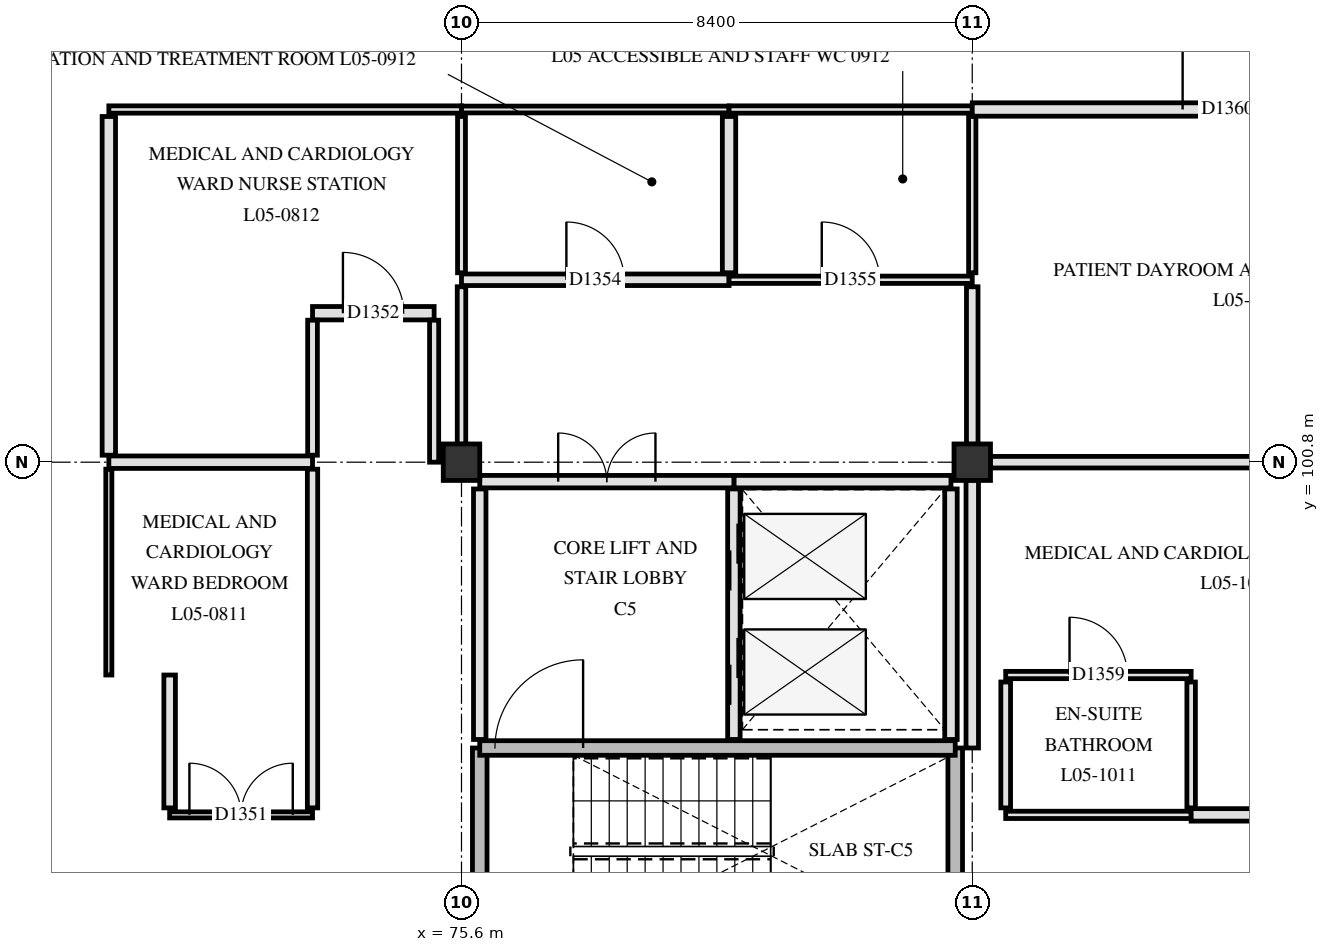
"""IFC4 building model, lengths in metres.
Left out: names, types, materials, properties, quantities, classifications, styles, units other than length and angle.
Written with IfcOpenShell. Run it as: python <this file> out.ifc"""

import sys

from ifc_helpers import new_model, si_unit, direction, frame, frame_2d, origin, origin_2d, place, context, subcontext, project, spatial, rectangle, extrude, element, fill, save


model = new_model("IFC4")
c1 = context("Model", 3, precision=1e-05, world=origin(), true_north=direction((0.0, 1.0)))
c2 = subcontext(c1, "Body", "Model", "MODEL_VIEW")
j1 = project(units=[si_unit("LENGTHUNIT", "METRE"), si_unit("PLANEANGLEUNIT", "RADIAN")], contexts=[c1])
p1 = place(None, origin())
s1 = spatial("IfcSite", under=j1, at=p1, CompositionType="ELEMENT")
p2 = place(p1, origin())
s2 = spatial("IfcBuilding", under=s1, at=p2, CompositionType="ELEMENT")
p3 = place(p2, frame((0.0, 0.0, 22.5)))
s3 = spatial("IfcBuildingStorey", under=s2, at=p3, CompositionType="ELEMENT", Elevation=22.5)
for number, where, z_axis, x_axis in (
    (1, (75.6, 100.8, 0.0), (0.0, 0.0, 1.0), (1.0, 0.0, 0.0)),
    (2, (84.0, 100.8, 0.0), (0.0, 0.0, 1.0), (1.0, 0.0, 0.0)),
):
    element("IfcColumn", number, at=place(p3, frame(where, z_axis=z_axis, x_axis=x_axis)), inside=s3, PredefinedType="COLUMN", context=c2, shape_type="SweptSolid", body=[
        extrude(rectangle(XDim=0.6, YDim=0.6, at=origin_2d()), origin(), (0.0, 0.0, 1.0), 3.9),
    ])
for number, where, z_axis, x_axis in (
    (3, (75.9, 92.78, 0.0), (0.0, 0.0, 1.0), (0.0, 1.0, 0.0)),
    (4, (83.72, 92.78, 0.0), (0.0, 0.0, 1.0), (0.0, 1.0, 0.0)),
):
    element("IfcWall", number, at=place(p3, frame(where, z_axis=z_axis, x_axis=x_axis)), inside=s3, PredefinedType="SHEAR", context=c2, shape_type="SweptSolid", body=[
        extrude(rectangle(XDim=3.32, YDim=0.24, at=frame_2d((1.66, 0.0))), origin(), (0.0, 0.0, 1.0), 3.62),
    ])
p4 = place(p3, frame((75.9, 96.1, 0.0), z_axis=(0.0, 0.0, 1.0), x_axis=(1.0, 0.0, 0.0)))
e5 = element("IfcWall", 5, at=p4, inside=s3, PredefinedType="SHEAR", context=c2, shape_type="SweptSolid", body=[
    extrude(rectangle(XDim=7.82, YDim=0.24, at=frame_2d((3.91, 0.0))), origin(), (0.0, 0.0, 1.0), 3.62),
])
p5 = place(p4, frame((0.25, 0.0, 0.0)))
e6 = element("IfcOpeningElement", 6, at=p5, cuts=e5, PredefinedType="OPENING", context=c2, shape_type="SweptSolid", body=[
    extrude(rectangle(XDim=1.45, YDim=2.2, at=frame_2d((0.725, 1.1))), frame((0.0, 0.13, 0.0), z_axis=(0.0, -1.0, 0.0), x_axis=(1.0, 0.0, 0.0)), (0.0, 0.0, 1.0), 0.26),
])
p6 = place(p3, frame((80.08, 96.24, 0.0), z_axis=(0.0, 0.0, 1.0), x_axis=(0.0, 1.0, 0.0)))
e7 = element("IfcWall", 7, at=p6, inside=s3, PredefinedType="PARTITIONING", context=c2, shape_type="SweptSolid", body=[
    extrude(rectangle(XDim=4.12, YDim=0.205, at=frame_2d((2.06, 0.0))), origin(), (0.0, 0.0, 1.0), 3.61),
])
p7 = place(p6, frame((0.57, 0.0, 0.0)))
e8 = element("IfcOpeningElement", 8, at=p7, cuts=e7, PredefinedType="OPENING", context=c2, shape_type="SweptSolid", body=[
    extrude(rectangle(XDim=1.1, YDim=2.15, at=frame_2d((0.55, 1.075))), frame((0.0, 0.113, 0.0), z_axis=(0.0, -1.0, 0.0), x_axis=(1.0, 0.0, 0.0)), (0.0, 0.0, 1.0), 0.225),
])
p8 = place(p6, frame((2.45, 0.0, 0.0)))
e9 = element("IfcOpeningElement", 9, at=p8, cuts=e7, PredefinedType="OPENING", context=c2, shape_type="SweptSolid", body=[
    extrude(rectangle(XDim=1.1, YDim=2.15, at=frame_2d((0.55, 1.075))), frame((0.0, 0.113, 0.0), z_axis=(0.0, -1.0, 0.0), x_axis=(1.0, 0.0, 0.0)), (0.0, 0.0, 1.0), 0.225),
])
p9 = place(p3, frame((83.65, 96.24, 0.0), z_axis=(0.0, 0.0, 1.0), x_axis=(0.0, 1.0, 0.0)))
e10 = element("IfcWall", 10, at=p9, inside=s3, PredefinedType="PARTITIONING", context=c2, shape_type="SweptSolid", body=[
    extrude(rectangle(XDim=4.12, YDim=0.205, at=frame_2d((2.06, 0.0))), origin(), (0.0, 0.0, 1.0), 3.61),
])
p10 = place(p3, frame((80.08, 100.48, 0.0), z_axis=(0.0, 0.0, 1.0), x_axis=(1.0, 0.0, 0.0)))
e11 = element("IfcWall", 11, at=p10, inside=s3, PredefinedType="PARTITIONING", context=c2, shape_type="SweptSolid", body=[
    extrude(rectangle(XDim=3.57, YDim=0.205, at=frame_2d((1.785, 0.0))), origin(), (0.0, 0.0, 1.0), 3.61),
])
p11 = place(p3, frame((75.9, 96.24, 0.0), z_axis=(0.0, 0.0, 1.0), x_axis=(0.0, 1.0, 0.0)))
e12 = element("IfcWall", 12, at=p11, inside=s3, PredefinedType="PARTITIONING", context=c2, shape_type="SweptSolid", body=[
    extrude(rectangle(XDim=4.12, YDim=0.205, at=frame_2d((2.06, 0.0))), origin(), (0.0, 0.0, 1.0), 3.61),
])
p12 = place(p3, frame((75.9, 100.48, 0.0), z_axis=(0.0, 0.0, 1.0), x_axis=(1.0, 0.0, 0.0)))
e13 = element("IfcWall", 13, at=p12, inside=s3, PredefinedType="PARTITIONING", context=c2, shape_type="SweptSolid", body=[
    extrude(rectangle(XDim=4.18, YDim=0.205, at=frame_2d((2.09, 0.0))), origin(), (0.0, 0.0, 1.0), 3.61),
])
p13 = place(p12, frame((1.29, 0.0, 0.0)))
e14 = element("IfcOpeningElement", 14, at=p13, cuts=e13, PredefinedType="OPENING", context=c2, shape_type="SweptSolid", body=[
    extrude(rectangle(XDim=1.6, YDim=2.25, at=frame_2d((0.8, 1.125))), frame((0.0, 0.113, 0.0), z_axis=(0.0, -1.0, 0.0), x_axis=(1.0, 0.0, 0.0)), (0.0, 0.0, 1.0), 0.225),
])
p14 = place(p3, frame((70.8, 95.0, 0.0), z_axis=(0.0, 0.0, 1.0), x_axis=(1.0, 0.0, 0.0)))
e15 = element("IfcWall", 15, at=p14, inside=s3, PredefinedType="PARTITIONING", context=c2, shape_type="SweptSolid", body=[
    extrude(rectangle(XDim=2.35, YDim=0.1, at=frame_2d((1.175, 0.0))), origin(), (0.0, 0.0, 1.0), 3.61),
])
p15 = place(p14, frame((0.325, 0.0, 0.0)))
e16 = element("IfcOpeningElement", 16, at=p15, cuts=e15, PredefinedType="OPENING", context=c2, shape_type="SweptSolid", body=[
    extrude(rectangle(XDim=1.7, YDim=2.25, at=frame_2d((0.85, 1.125))), frame((0.0, 0.06, 0.0), z_axis=(0.0, -1.0, 0.0), x_axis=(1.0, 0.0, 0.0)), (0.0, 0.0, 1.0), 0.12),
])
p16 = place(p3, frame((84.55, 95.0, 0.0), z_axis=(0.0, 0.0, 1.0), x_axis=(1.0, 0.0, 0.0)))
e17 = element("IfcWall", 17, at=p16, inside=s3, PredefinedType="PARTITIONING", context=c2, shape_type="SweptSolid", body=[
    extrude(rectangle(XDim=3.05, YDim=0.12, at=frame_2d((1.525, 0.0))), origin(), (0.0, 0.0, 1.0), 3.61),
])
p17 = place(p3, frame((87.6, 95.0, 0.0), z_axis=(0.0, 0.0, 1.0), x_axis=(1.0, 0.0, 0.0)))
e18 = element("IfcWall", 18, at=p17, inside=s3, PredefinedType="PARTITIONING", context=c2, shape_type="SweptSolid", body=[
    extrude(rectangle(XDim=4.8, YDim=0.205, at=frame_2d((2.4, 0.0))), origin(), (0.0, 0.0, 1.0), 3.3),
])
p18 = place(p17, frame((1.775, 0.0, 0.0)))
e19 = element("IfcOpeningElement", 19, at=p18, cuts=e18, PredefinedType="OPENING", context=c2, shape_type="SweptSolid", body=[
    extrude(rectangle(XDim=1.25, YDim=2.2, at=frame_2d((0.625, 1.1))), frame((0.0, 0.113, 0.0), z_axis=(0.0, -1.0, 0.0), x_axis=(1.0, 0.0, 0.0)), (0.0, 0.0, 1.0), 0.225),
])
p19 = place(p3, frame((84.55, 97.3, 0.0), z_axis=(0.0, 0.0, 1.0), x_axis=(1.0, 0.0, 0.0)))
e20 = element("IfcWall", 20, at=p19, inside=s3, PredefinedType="PARTITIONING", context=c2, shape_type="SweptSolid", body=[
    extrude(rectangle(XDim=3.05, YDim=0.12, at=frame_2d((1.525, 0.0))), origin(), (0.0, 0.0, 1.0), 3.61),
])
p20 = place(p19, frame((1.05, 0.0, 0.0)))
e21 = element("IfcOpeningElement", 21, at=p20, cuts=e20, PredefinedType="OPENING", context=c2, shape_type="SweptSolid", body=[
    extrude(rectangle(XDim=0.95, YDim=2.1, at=frame_2d((0.475, 1.05))), frame((0.0, 0.07, 0.0), z_axis=(0.0, -1.0, 0.0), x_axis=(1.0, 0.0, 0.0)), (0.0, 0.0, 1.0), 0.14),
])
p21 = place(p3, frame((69.8, 100.8, 0.0), z_axis=(0.0, 0.0, 1.0), x_axis=(1.0, 0.0, 0.0)))
e22 = element("IfcWall", 22, at=p21, inside=s3, PredefinedType="PARTITIONING", context=c2, shape_type="SweptSolid", body=[
    extrude(rectangle(XDim=3.35, YDim=0.205, at=frame_2d((1.675, 0.0))), origin(), (0.0, 0.0, 1.0), 3.16),
])
p22 = place(p3, frame((84.295, 100.8, 0.0), z_axis=(0.0, 0.0, 1.0), x_axis=(1.0, 0.0, 0.0)))
e23 = element("IfcWall", 23, at=p22, inside=s3, PredefinedType="PARTITIONING", context=c2, shape_type="SweptSolid", body=[
    extrude(rectangle(XDim=7.81, YDim=0.19, at=frame_2d((3.905, 0.0))), origin(), (0.0, 0.0, 1.0), 3.16),
])
p23 = place(p3, frame((73.15, 103.25, 0.0), z_axis=(0.0, 0.0, 1.0), x_axis=(1.0, 0.0, 0.0)))
e24 = element("IfcWall", 24, at=p23, inside=s3, PredefinedType="PARTITIONING", context=c2, shape_type="SweptSolid", body=[
    extrude(rectangle(XDim=2.0, YDim=0.22, at=frame_2d((1.0, 0.0))), origin(), (0.0, 0.0, 1.0), 3.61),
])
p24 = place(p23, frame((0.5, 0.0, 0.0)))
e25 = element("IfcOpeningElement", 25, at=p24, cuts=e24, PredefinedType="OPENING", context=c2, shape_type="SweptSolid", body=[
    extrude(rectangle(XDim=1.0, YDim=2.15, at=frame_2d((0.5, 1.075))), frame((0.0, 0.12, 0.0), z_axis=(0.0, -1.0, 0.0), x_axis=(1.0, 0.0, 0.0)), (0.0, 0.0, 1.0), 0.24),
])
p25 = place(p3, frame((75.6, 103.8, 0.0), z_axis=(0.0, 0.0, 1.0), x_axis=(1.0, 0.0, 0.0)))
e26 = element("IfcWall", 26, at=p25, inside=s3, PredefinedType="PARTITIONING", context=c2, shape_type="SweptSolid", body=[
    extrude(rectangle(XDim=4.4, YDim=0.19, at=frame_2d((2.2, 0.0))), origin(), (0.0, 0.0, 1.0), 3.3),
])
p26 = place(p25, frame((1.725, 0.0, 0.0)))
e27 = element("IfcOpeningElement", 27, at=p26, cuts=e26, PredefinedType="OPENING", context=c2, shape_type="SweptSolid", body=[
    extrude(rectangle(XDim=0.95, YDim=2.1, at=frame_2d((0.475, 1.05))), frame((0.0, 0.105, 0.0), z_axis=(0.0, -1.0, 0.0), x_axis=(1.0, 0.0, 0.0)), (0.0, 0.0, 1.0), 0.21),
])
p27 = place(p3, frame((80.0, 103.8, 0.0), z_axis=(0.0, 0.0, 1.0), x_axis=(1.0, 0.0, 0.0)))
e28 = element("IfcWall", 28, at=p27, inside=s3, PredefinedType="PARTITIONING", context=c2, shape_type="SweptSolid", body=[
    extrude(rectangle(XDim=4.0, YDim=0.12, at=frame_2d((2.0, 0.0))), origin(), (0.0, 0.0, 1.0), 3.3),
])
p28 = place(p27, frame((1.525, 0.0, 0.0)))
e29 = element("IfcOpeningElement", 29, at=p28, cuts=e28, PredefinedType="OPENING", context=c2, shape_type="SweptSolid", body=[
    extrude(rectangle(XDim=0.95, YDim=2.1, at=frame_2d((0.475, 1.05))), frame((0.0, 0.07, 0.0), z_axis=(0.0, -1.0, 0.0), x_axis=(1.0, 0.0, 0.0)), (0.0, 0.0, 1.0), 0.14),
])
p29 = place(p3, frame((69.8, 106.6, 0.0), z_axis=(0.0, 0.0, 1.0), x_axis=(1.0, 0.0, 0.0)))
e30 = element("IfcWall", 30, at=p29, inside=s3, PredefinedType="PARTITIONING", context=c2, shape_type="SweptSolid", body=[
    extrude(rectangle(XDim=5.8, YDim=0.12, at=frame_2d((2.9, 0.0))), origin(), (0.0, 0.0, 1.0), 3.3),
])
p30 = place(p3, frame((75.6, 106.6, 0.0), z_axis=(0.0, 0.0, 1.0), x_axis=(1.0, 0.0, 0.0)))
e31 = element("IfcWall", 31, at=p30, inside=s3, PredefinedType="PARTITIONING", context=c2, shape_type="SweptSolid", body=[
    extrude(rectangle(XDim=4.4, YDim=0.112, at=frame_2d((2.2, 0.0))), origin(), (0.0, 0.0, 1.0), 3.3),
])
p31 = place(p3, frame((80.0, 106.6, 0.0), z_axis=(0.0, 0.0, 1.0), x_axis=(1.0, 0.0, 0.0)))
e32 = element("IfcWall", 32, at=p31, inside=s3, PredefinedType="PARTITIONING", context=c2, shape_type="SweptSolid", body=[
    extrude(rectangle(XDim=4.0, YDim=0.12, at=frame_2d((2.0, 0.0))), origin(), (0.0, 0.0, 1.0), 3.3),
])
p32 = place(p3, frame((84.0, 106.6, 0.0), z_axis=(0.0, 0.0, 1.0), x_axis=(1.0, 0.0, 0.0)))
e33 = element("IfcWall", 33, at=p32, inside=s3, PredefinedType="PARTITIONING", context=c2, shape_type="SweptSolid", body=[
    extrude(rectangle(XDim=8.4, YDim=0.22, at=frame_2d((4.2, 0.0))), origin(), (0.0, 0.0, 1.0), 3.3),
])
p33 = place(p32, frame((3.46, 0.0, 0.0)))
e34 = element("IfcOpeningElement", 34, at=p33, cuts=e33, PredefinedType="OPENING", context=c2, shape_type="SweptSolid", body=[
    extrude(rectangle(XDim=1.48, YDim=2.22, at=frame_2d((0.74, 1.11))), frame((0.0, 0.12, 0.0), z_axis=(0.0, -1.0, 0.0), x_axis=(1.0, 0.0, 0.0)), (0.0, 0.0, 1.0), 0.24),
])
p34 = place(p3, frame((69.8, 97.3, 0.0), z_axis=(0.0, 0.0, 1.0), x_axis=(0.0, 1.0, 0.0)))
e35 = element("IfcWall", 35, at=p34, inside=s3, PredefinedType="PARTITIONING", context=c2, shape_type="SweptSolid", body=[
    extrude(rectangle(XDim=3.385, YDim=0.1, at=frame_2d((1.692, 0.0))), origin(), (0.0, 0.0, 1.0), 3.34),
])
p35 = place(p3, frame((69.8, 100.915, 0.0), z_axis=(0.0, 0.0, 1.0), x_axis=(0.0, 1.0, 0.0)))
e36 = element("IfcWall", 36, at=p35, inside=s3, PredefinedType="PARTITIONING", context=c2, shape_type="SweptSolid", body=[
    extrude(rectangle(XDim=5.57, YDim=0.22, at=frame_2d((2.785, 0.0))), origin(), (0.0, 0.0, 1.0), 3.34),
])
p36 = place(p3, frame((70.8, 95.115, 0.0), z_axis=(0.0, 0.0, 1.0), x_axis=(0.0, 1.0, 0.0)))
e37 = element("IfcWall", 37, at=p36, inside=s3, PredefinedType="PARTITIONING", context=c2, shape_type="SweptSolid", body=[
    extrude(rectangle(XDim=2.185, YDim=0.19, at=frame_2d((1.093, 0.0))), origin(), (0.0, 0.0, 1.0), 3.34),
])
p37 = place(p3, frame((73.15, 95.115, 0.0), z_axis=(0.0, 0.0, 1.0), x_axis=(0.0, 1.0, 0.0)))
e38 = element("IfcWall", 38, at=p37, inside=s3, PredefinedType="PARTITIONING", context=c2, shape_type="SweptSolid", body=[
    extrude(rectangle(XDim=5.57, YDim=0.17, at=frame_2d((2.785, 0.0))), origin(), (0.0, 0.0, 1.0), 3.34),
])
p38 = place(p3, frame((73.15, 100.915, 0.0), z_axis=(0.0, 0.0, 1.0), x_axis=(0.0, 1.0, 0.0)))
e39 = element("IfcWall", 39, at=p38, inside=s3, PredefinedType="PARTITIONING", context=c2, shape_type="SweptSolid", body=[
    extrude(rectangle(XDim=2.22, YDim=0.16, at=frame_2d((1.11, 0.0))), origin(), (0.0, 0.0, 1.0), 3.61),
])
p39 = place(p3, frame((75.15, 100.8, 0.0), z_axis=(0.0, 0.0, 1.0), x_axis=(0.0, 1.0, 0.0)))
e40 = element("IfcWall", 40, at=p39, inside=s3, PredefinedType="PARTITIONING", context=c2, shape_type="SweptSolid", body=[
    extrude(rectangle(XDim=2.335, YDim=0.15, at=frame_2d((1.167, 0.0))), origin(), (0.0, 0.0, 1.0), 3.16),
])
p40 = place(p3, frame((75.6, 101.095, 0.0), z_axis=(0.0, 0.0, 1.0), x_axis=(0.0, 1.0, 0.0)))
e41 = element("IfcWall", 41, at=p40, inside=s3, PredefinedType="PARTITIONING", context=c2, shape_type="SweptSolid", body=[
    extrude(rectangle(XDim=2.59, YDim=0.14, at=frame_2d((1.295, 0.0))), origin(), (0.0, 0.0, 1.0), 3.3),
])
p41 = place(p3, frame((75.6, 103.915, 0.0), z_axis=(0.0, 0.0, 1.0), x_axis=(0.0, 1.0, 0.0)))
e42 = element("IfcWall", 42, at=p41, inside=s3, PredefinedType="PARTITIONING", context=c2, shape_type="SweptSolid", body=[
    extrude(rectangle(XDim=2.57, YDim=0.13, at=frame_2d((1.285, 0.0))), origin(), (0.0, 0.0, 1.0), 3.3),
])
p42 = place(p3, frame((80.0, 103.915, 0.0), z_axis=(0.0, 0.0, 1.0), x_axis=(0.0, 1.0, 0.0)))
e43 = element("IfcWall", 43, at=p42, inside=s3, PredefinedType="PARTITIONING", context=c2, shape_type="SweptSolid", body=[
    extrude(rectangle(XDim=2.57, YDim=0.22, at=frame_2d((1.285, 0.0))), origin(), (0.0, 0.0, 1.0), 3.34),
])
p43 = place(p3, frame((84.0, 96.1, 0.0), z_axis=(0.0, 0.0, 1.0), x_axis=(0.0, 1.0, 0.0)))
e44 = element("IfcWall", 44, at=p43, inside=s3, PredefinedType="PARTITIONING", context=c2, shape_type="SweptSolid", body=[
    extrude(rectangle(XDim=4.405, YDim=0.205, at=frame_2d((2.202, 0.0))), origin(), (0.0, 0.0, 1.0), 3.3),
])
p44 = place(p3, frame((84.0, 101.095, 0.0), z_axis=(0.0, 0.0, 1.0), x_axis=(0.0, 1.0, 0.0)))
e45 = element("IfcWall", 45, at=p44, inside=s3, PredefinedType="PARTITIONING", context=c2, shape_type="SweptSolid", body=[
    extrude(rectangle(XDim=2.59, YDim=0.19, at=frame_2d((1.295, 0.0))), origin(), (0.0, 0.0, 1.0), 3.3),
])
p45 = place(p3, frame((84.0, 103.915, 0.0), z_axis=(0.0, 0.0, 1.0), x_axis=(0.0, 1.0, 0.0)))
e46 = element("IfcWall", 46, at=p45, inside=s3, PredefinedType="PARTITIONING", context=c2, shape_type="SweptSolid", body=[
    extrude(rectangle(XDim=2.57, YDim=0.12, at=frame_2d((1.285, 0.0))), origin(), (0.0, 0.0, 1.0), 3.3),
])
p46 = place(p3, frame((84.55, 95.115, 0.0), z_axis=(0.0, 0.0, 1.0), x_axis=(0.0, 1.0, 0.0)))
e47 = element("IfcWall", 47, at=p46, inside=s3, PredefinedType="PARTITIONING", context=c2, shape_type="SweptSolid", body=[
    extrude(rectangle(XDim=2.07, YDim=0.16, at=frame_2d((1.035, 0.0))), origin(), (0.0, 0.0, 1.0), 3.34),
])
p47 = place(p3, frame((87.6, 95.115, 0.0), z_axis=(0.0, 0.0, 1.0), x_axis=(0.0, 1.0, 0.0)))
e48 = element("IfcWall", 48, at=p47, inside=s3, PredefinedType="PARTITIONING", context=c2, shape_type="SweptSolid", body=[
    extrude(rectangle(XDim=2.07, YDim=0.14, at=frame_2d((1.035, 0.0))), origin(), (0.0, 0.0, 1.0), 3.34),
])
p48 = place(p5, origin())
e49 = element("IfcDoor", 49, at=p48, inside=s3, OperationType="SINGLE_SWING_RIGHT", PredefinedType="DOOR", context=c2, shape_type="SweptSolid", body=[
    extrude(rectangle(XDim=1.45, YDim=2.2, at=frame_2d((0.725, 1.1))), frame((0.0, 0.025, 0.0), z_axis=(0.0, -1.0, 0.0), x_axis=(1.0, 0.0, 0.0)), (0.0, 0.0, 1.0), 0.05),
])
fill(e6, e49)
p49 = place(p7, origin())
e50 = element("IfcDoor", 50, at=p49, inside=s3, OperationType="SLIDING_TO_LEFT", PredefinedType="DOOR", context=c2, shape_type="SweptSolid", body=[
    extrude(rectangle(XDim=1.1, YDim=2.15, at=frame_2d((0.55, 1.075))), frame((0.0, 0.025, 0.0), z_axis=(0.0, -1.0, 0.0), x_axis=(1.0, 0.0, 0.0)), (0.0, 0.0, 1.0), 0.05),
])
fill(e8, e50)
p50 = place(p8, origin())
e51 = element("IfcDoor", 51, at=p50, inside=s3, OperationType="SLIDING_TO_LEFT", PredefinedType="DOOR", context=c2, shape_type="SweptSolid", body=[
    extrude(rectangle(XDim=1.1, YDim=2.15, at=frame_2d((0.55, 1.075))), frame((0.0, 0.025, 0.0), z_axis=(0.0, -1.0, 0.0), x_axis=(1.0, 0.0, 0.0)), (0.0, 0.0, 1.0), 0.05),
])
fill(e9, e51)
p51 = place(p13, origin())
e52 = element("IfcDoor", 52, at=p51, inside=s3, OperationType="DOUBLE_SWING_LEFT", PredefinedType="DOOR", context=c2, shape_type="SweptSolid", body=[
    extrude(rectangle(XDim=1.6, YDim=2.25, at=frame_2d((0.8, 1.125))), frame((0.0, 0.025, 0.0), z_axis=(0.0, -1.0, 0.0), x_axis=(1.0, 0.0, 0.0)), (0.0, 0.0, 1.0), 0.05),
])
fill(e14, e52)
p52 = place(p15, origin())
e53 = element("IfcDoor", 53, at=p52, inside=s3, OperationType="DOUBLE_SWING_RIGHT", PredefinedType="DOOR", context=c2, shape_type="SweptSolid", body=[
    extrude(rectangle(XDim=1.7, YDim=2.25, at=frame_2d((0.85, 1.125))), frame((0.0, 0.025, 0.0), z_axis=(0.0, -1.0, 0.0), x_axis=(1.0, 0.0, 0.0)), (0.0, 0.0, 1.0), 0.05),
])
fill(e16, e53)
p53 = place(p24, origin())
e54 = element("IfcDoor", 54, at=p53, inside=s3, OperationType="SINGLE_SWING_LEFT", PredefinedType="DOOR", context=c2, shape_type="SweptSolid", body=[
    extrude(rectangle(XDim=1.0, YDim=2.15, at=frame_2d((0.5, 1.075))), frame((0.0, 0.025, 0.0), z_axis=(0.0, -1.0, 0.0), x_axis=(1.0, 0.0, 0.0)), (0.0, 0.0, 1.0), 0.05),
])
fill(e25, e54)
p54 = place(p26, origin())
e55 = element("IfcDoor", 55, at=p54, inside=s3, OperationType="SINGLE_SWING_LEFT", PredefinedType="DOOR", context=c2, shape_type="SweptSolid", body=[
    extrude(rectangle(XDim=0.95, YDim=2.1, at=frame_2d((0.475, 1.05))), frame((0.0, 0.025, 0.0), z_axis=(0.0, -1.0, 0.0), x_axis=(1.0, 0.0, 0.0)), (0.0, 0.0, 1.0), 0.05),
])
fill(e27, e55)
p55 = place(p28, origin())
e56 = element("IfcDoor", 56, at=p55, inside=s3, OperationType="SINGLE_SWING_LEFT", PredefinedType="DOOR", context=c2, shape_type="SweptSolid", body=[
    extrude(rectangle(XDim=0.95, YDim=2.1, at=frame_2d((0.475, 1.05))), frame((0.0, 0.025, 0.0), z_axis=(0.0, -1.0, 0.0), x_axis=(1.0, 0.0, 0.0)), (0.0, 0.0, 1.0), 0.05),
])
fill(e29, e56)
p56 = place(p20, origin())
e57 = element("IfcDoor", 57, at=p56, inside=s3, OperationType="SINGLE_SWING_LEFT", PredefinedType="DOOR", context=c2, shape_type="SweptSolid", body=[
    extrude(rectangle(XDim=0.95, YDim=2.1, at=frame_2d((0.475, 1.05))), frame((0.0, 0.025, 0.0), z_axis=(0.0, -1.0, 0.0), x_axis=(1.0, 0.0, 0.0)), (0.0, 0.0, 1.0), 0.05),
])
fill(e21, e57)
p57 = place(p33, origin())
e58 = element("IfcDoor", 58, at=p57, inside=s3, OperationType="SINGLE_SWING_LEFT", PredefinedType="DOOR", context=c2, shape_type="SweptSolid", body=[
    extrude(rectangle(XDim=1.48, YDim=2.22, at=frame_2d((0.74, 1.11))), frame((0.0, 0.025, 0.0), z_axis=(0.0, -1.0, 0.0), x_axis=(1.0, 0.0, 0.0)), (0.0, 0.0, 1.0), 0.05),
])
fill(e34, e58)
save(model, sys.argv[1])
